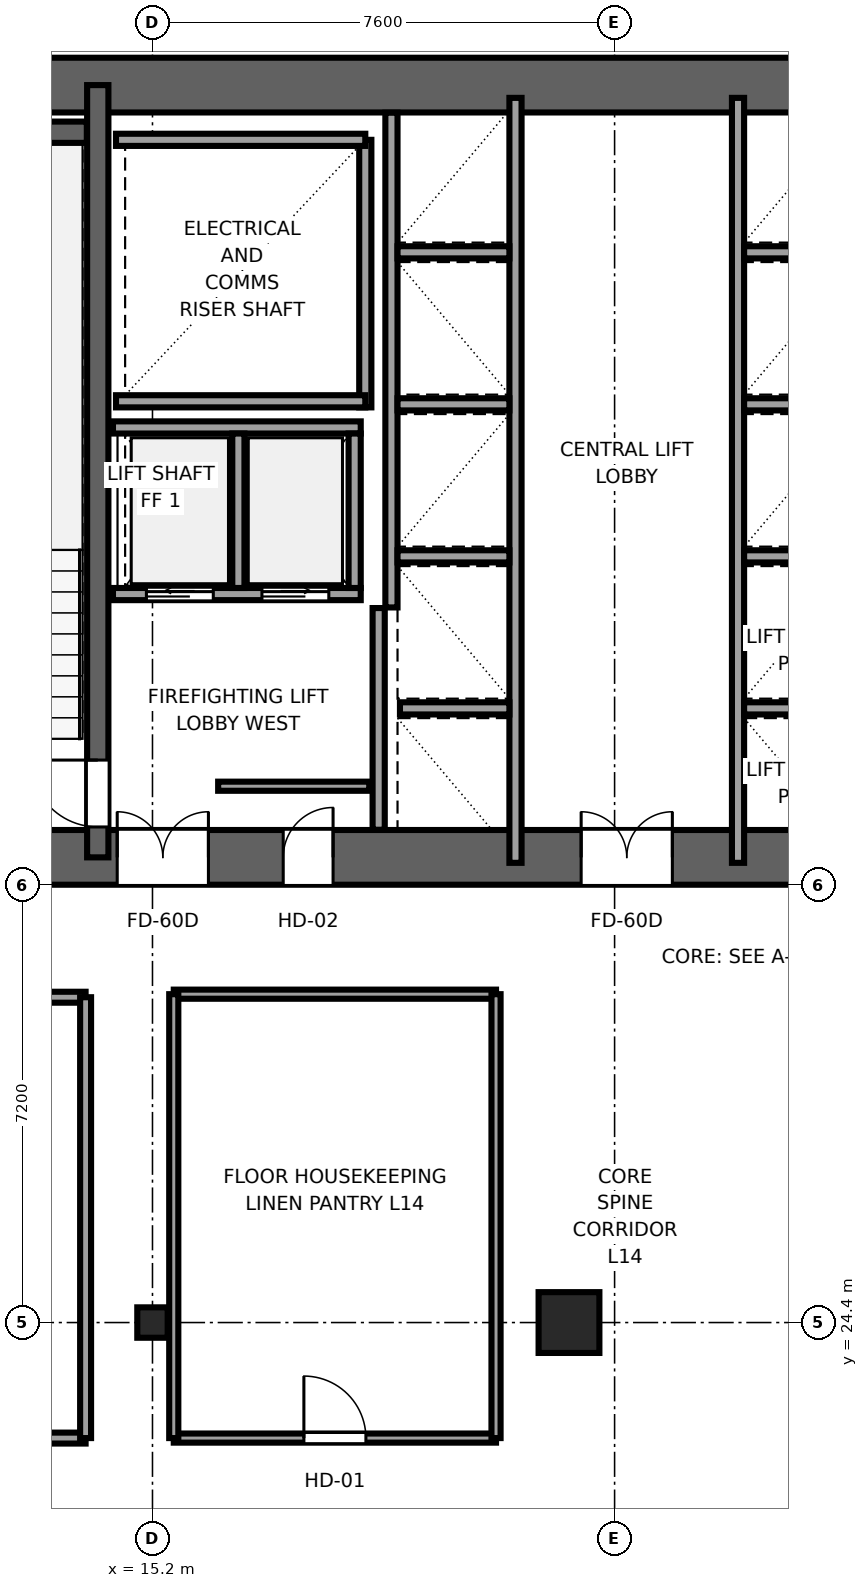
"""IFC4 building model, lengths in metres.
Left out: names, types, materials, properties, quantities, classifications, styles, units other than length and angle.
Written with IfcOpenShell. Run it as: python <this file> out.ifc"""

import sys

from ifc_helpers import new_model, si_unit, direction, frame, frame_2d, origin, origin_2d, place, context, subcontext, project, spatial, rectangle, i_section, extrude, source, transform, mapped, element, fill, save


model = new_model("IFC4")
c1 = context("Model", 3, precision=1e-05, world=origin(), true_north=direction((0.0, 1.0)))
c2 = subcontext(c1, "Body", "Model", "MODEL_VIEW")
j1 = project(units=[si_unit("LENGTHUNIT", "METRE"), si_unit("PLANEANGLEUNIT", "RADIAN")], contexts=[c1])
p1 = place(None, origin())
s1 = spatial("IfcSite", under=j1, at=p1, CompositionType="ELEMENT")
p2 = place(p1, origin())
s2 = spatial("IfcBuilding", under=s1, at=p2, CompositionType="ELEMENT")
p3 = place(p2, frame((0.0, 0.0, 60.4)))
s3 = spatial("IfcBuildingStorey", under=s2, at=p3, CompositionType="ELEMENT", Elevation=60.4)
p4 = place(p3, frame((9.6, 32.05, 0.0), z_axis=(0.0, 0.0, 1.0), x_axis=(1.0, 0.0, 0.0)))
e1 = element("IfcWall", 1, at=p4, inside=s3, PredefinedType="SHEAR", context=c2, shape_type="SweptSolid", body=[
    extrude(rectangle(XDim=26.8, YDim=0.9, at=frame_2d((13.4, 0.0))), origin(), (0.0, 0.0, 1.0), 3.55),
])
p5 = place(p4, frame((6.52, 0.0, 0.0), z_axis=(0.0, 0.0, 1.0), x_axis=(-1.0, 0.0, 0.0)))
e2 = element("IfcOpeningElement", 2, at=p5, cuts=e1, PredefinedType="OPENING", context=c2, shape_type="SweptSolid", body=[
    extrude(rectangle(XDim=1.5, YDim=2.04, at=frame_2d((0.75, 1.02))), frame((0.0, 0.46, 0.0), z_axis=(0.0, -1.0, 0.0), x_axis=(1.0, 0.0, 0.0)), (0.0, 0.0, 1.0), 0.92),
])
p6 = place(p4, frame((14.15, 0.0, 0.0), z_axis=(0.0, 0.0, 1.0), x_axis=(-1.0, 0.0, 0.0)))
e3 = element("IfcOpeningElement", 3, at=p6, cuts=e1, PredefinedType="OPENING", context=c2, shape_type="SweptSolid", body=[
    extrude(rectangle(XDim=1.5, YDim=2.04, at=frame_2d((0.75, 1.02))), frame((0.0, 0.46, 0.0), z_axis=(0.0, -1.0, 0.0), x_axis=(1.0, 0.0, 0.0)), (0.0, 0.0, 1.0), 0.92),
])
p7 = place(p4, frame((21.78, 0.0, 0.0), z_axis=(0.0, 0.0, 1.0), x_axis=(-1.0, 0.0, 0.0)))
e4 = element("IfcOpeningElement", 4, at=p7, cuts=e1, PredefinedType="OPENING", context=c2, shape_type="SweptSolid", body=[
    extrude(rectangle(XDim=1.5, YDim=2.04, at=frame_2d((0.75, 1.02))), frame((0.0, 0.46, 0.0), z_axis=(0.0, -1.0, 0.0), x_axis=(1.0, 0.0, 0.0)), (0.0, 0.0, 1.0), 0.92),
])
p8 = place(p4, frame((8.57, 0.0, 0.0), z_axis=(0.0, 0.0, 1.0), x_axis=(-1.0, 0.0, 0.0)))
e5 = element("IfcOpeningElement", 5, at=p8, cuts=e1, PredefinedType="OPENING", context=c2, shape_type="SweptSolid", body=[
    extrude(rectangle(XDim=0.82, YDim=2.01, at=frame_2d((0.41, 1.005))), frame((0.0, 0.46, 0.0), z_axis=(0.0, -1.0, 0.0), x_axis=(1.0, 0.0, 0.0)), (0.0, 0.0, 1.0), 0.92),
])
p9 = place(p4, frame((19.07, 0.0, 0.0), z_axis=(0.0, 0.0, 1.0), x_axis=(-1.0, 0.0, 0.0)))
e6 = element("IfcOpeningElement", 6, at=p9, cuts=e1, PredefinedType="OPENING", context=c2, shape_type="SweptSolid", body=[
    extrude(rectangle(XDim=0.82, YDim=2.01, at=frame_2d((0.41, 1.005))), frame((0.0, 0.46, 0.0), z_axis=(0.0, -1.0, 0.0), x_axis=(1.0, 0.0, 0.0)), (0.0, 0.0, 1.0), 0.92),
])
p10 = place(p3, frame((9.6, 44.75, 0.0), z_axis=(0.0, 0.0, 1.0), x_axis=(1.0, 0.0, 0.0)))
e7 = element("IfcWall", 7, at=p10, inside=s3, PredefinedType="SHEAR", context=c2, shape_type="SweptSolid", body=[
    extrude(rectangle(XDim=26.8, YDim=0.9, at=frame_2d((13.4, 0.0))), origin(), (0.0, 0.0, 1.0), 3.55),
])
p11 = place(p3, frame((14.3, 32.05, 0.0), z_axis=(0.0, 0.0, 1.0), x_axis=(0.0, 1.0, 0.0)))
e8 = element("IfcWall", 8, at=p11, inside=s3, PredefinedType="SHEAR", context=c2, shape_type="SweptSolid", body=[
    extrude(rectangle(XDim=12.7, YDim=0.35, at=frame_2d((6.35, 0.0))), origin(), (0.0, 0.0, 1.0), 3.55),
])
p12 = place(p11, frame((0.5, 0.0, 0.0)))
e9 = element("IfcOpeningElement", 9, at=p12, cuts=e8, PredefinedType="OPENING", context=c2, shape_type="SweptSolid", body=[
    extrude(rectangle(XDim=1.1, YDim=2.12, at=frame_2d((0.55, 1.06))), frame((0.0, 0.185, 0.0), z_axis=(0.0, -1.0, 0.0), x_axis=(1.0, 0.0, 0.0)), (0.0, 0.0, 1.0), 0.37),
])
p13 = place(p3, frame((10.52, 43.975, 0.0), z_axis=(0.0, 0.0, 1.0), x_axis=(1.0, 0.0, 0.0)))
e10 = element("IfcWall", 10, at=p13, inside=s3, PredefinedType="SHEAR", context=c2, shape_type="SweptSolid", body=[
    extrude(rectangle(XDim=3.6, YDim=0.35, at=frame_2d((1.8, 0.0))), origin(), (0.0, 0.0, 1.0), 3.55),
])
m1 = source(origin(), c2, "Body", "SweptSolid", [
    extrude(i_section(OverallWidth=0.5, OverallDepth=0.5, WebThickness=0.028, FlangeThickness=0.045, at=origin_2d()), origin(), (0.0, 0.0, 1.0), 3.55),
])
p14 = place(p3, frame((15.2, 24.4, 0.0), z_axis=(0.0, 0.0, 1.0), x_axis=(1.0, 0.0, 0.0)))
e11 = element("IfcColumn", 11, at=p14, inside=s3, PredefinedType="COLUMN", context=c2, shape_type="MappedRepresentation", body=[
    mapped(m1, transform((0.0, 0.0, 0.0), x_axis=(1.0, 0.0, 0.0), y_axis=(0.0, 1.0, 0.0), z_axis=(0.0, 0.0, 1.0), scale=1.0)),
])
m2 = source(origin(), c2, "Body", "SweptSolid", [
    extrude(rectangle(XDim=1.0, YDim=1.0, at=origin_2d()), origin(), (0.0, 0.0, 1.0), 3.55),
])
p15 = place(p3, frame((22.05, 24.4, 0.0), z_axis=(0.0, 0.0, 1.0), x_axis=(1.0, 0.0, 0.0)))
e12 = element("IfcColumn", 12, at=p15, inside=s3, PredefinedType="COLUMN", context=c2, shape_type="MappedRepresentation", body=[
    mapped(m2, transform((0.0, 0.0, 0.0), x_axis=(1.0, 0.0, 0.0), y_axis=(0.0, 1.0, 0.0), z_axis=(0.0, 0.0, 1.0), scale=1.0)),
])
p16 = place(p3, frame((18.7, 39.45, 0.0), z_axis=(0.0, 0.0, 1.0), x_axis=(0.0, 1.0, 0.0)))
e13 = element("IfcWall", 13, at=p16, inside=s3, PredefinedType="SOLIDWALL", context=c2, shape_type="SweptSolid", body=[
    extrude(rectangle(XDim=4.4, YDim=0.2, at=frame_2d((2.2, 0.0))), origin(), (0.0, 0.0, 1.0), 3.37),
])
for number, where, z_axis, x_axis in (
    (14, (14.6, 39.55, 0.0), (0.0, 0.0, 1.0), (1.0, 0.0, 0.0)),
    (15, (14.6, 43.85, 0.0), (0.0, 0.0, 1.0), (1.0, 0.0, 0.0)),
):
    element("IfcWall", number, at=place(p3, frame(where, z_axis=z_axis, x_axis=x_axis)), inside=s3, PredefinedType="SOLIDWALL", context=c2, shape_type="SweptSolid", body=[
        extrude(rectangle(XDim=4.1, YDim=0.2, at=frame_2d((2.05, 0.0))), origin(), (0.0, 0.0, 1.0), 3.37),
    ])
p17 = place(p3, frame((18.92, 32.504, 0.0), z_axis=(0.0, 0.0, 1.0), x_axis=(0.0, 1.0, 0.0)))
e16 = element("IfcWall", 16, at=p17, inside=s3, PredefinedType="SOLIDWALL", context=c2, shape_type="SweptSolid", body=[
    extrude(rectangle(XDim=3.646, YDim=0.2, at=frame_2d((1.823, 0.0))), origin(), (0.0, 0.0, 1.0), 3.37),
])
p18 = place(p3, frame((21.17, 31.96, 0.0), z_axis=(0.0, 0.0, 1.0), x_axis=(0.0, 1.0, 0.0)))
e17 = element("IfcWall", 17, at=p18, inside=s3, PredefinedType="SOLIDWALL", context=c2, shape_type="SweptSolid", body=[
    extrude(rectangle(XDim=12.58, YDim=0.2, at=frame_2d((6.29, 0.0))), origin(), (0.0, 0.0, 1.0), 3.37),
])
p19 = place(p3, frame((19.13, 36.16, 0.0), z_axis=(0.0, 0.0, 1.0), x_axis=(0.0, 1.0, 0.0)))
e18 = element("IfcWall", 18, at=p19, inside=s3, PredefinedType="SOLIDWALL", context=c2, shape_type="SweptSolid", body=[
    extrude(rectangle(XDim=8.136, YDim=0.2, at=frame_2d((4.068, 0.0))), origin(), (0.0, 0.0, 1.0), 3.37),
])
p20 = place(p3, frame((19.27, 34.5, 0.0), z_axis=(0.0, 0.0, 1.0), x_axis=(1.0, 0.0, 0.0)))
e19 = element("IfcWall", 19, at=p20, inside=s3, PredefinedType="SOLIDWALL", context=c2, shape_type="SweptSolid", body=[
    extrude(rectangle(XDim=1.8, YDim=0.2, at=frame_2d((0.9, 0.0))), origin(), (0.0, 0.0, 1.0), 3.37),
])
for number, where, z_axis, x_axis in (
    (20, (19.23, 37.0, 0.0), (0.0, 0.0, 1.0), (1.0, 0.0, 0.0)),
    (21, (19.23, 39.5, 0.0), (0.0, 0.0, 1.0), (1.0, 0.0, 0.0)),
    (22, (19.23, 42.0, 0.0), (0.0, 0.0, 1.0), (1.0, 0.0, 0.0)),
):
    element("IfcWall", number, at=place(p3, frame(where, z_axis=z_axis, x_axis=x_axis)), inside=s3, PredefinedType="SOLIDWALL", context=c2, shape_type="SweptSolid", body=[
        extrude(rectangle(XDim=1.84, YDim=0.2, at=frame_2d((0.92, 0.0))), origin(), (0.0, 0.0, 1.0), 3.37),
    ])
p21 = place(p3, frame((14.55, 36.38, 0.0), z_axis=(0.0, 0.0, 1.0), x_axis=(1.0, 0.0, 0.0)))
e23 = element("IfcWall", 23, at=p21, inside=s3, PredefinedType="SOLIDWALL", context=c2, shape_type="SweptSolid", body=[
    extrude(rectangle(XDim=4.075, YDim=0.2, at=frame_2d((2.038, 0.0))), origin(), (0.0, 0.0, 1.0), 3.37),
])
p22 = place(p21, frame((0.55, 0.0, 0.0)))
e24 = element("IfcOpeningElement", 24, at=p22, cuts=e23, PredefinedType="OPENING", context=c2, shape_type="SweptSolid", body=[
    extrude(rectangle(XDim=1.1, YDim=2.12, at=frame_2d((0.55, 1.06))), frame((0.0, 0.11, 0.0), z_axis=(0.0, -1.0, 0.0), x_axis=(1.0, 0.0, 0.0)), (0.0, 0.0, 1.0), 0.22),
])
p23 = place(p21, frame((2.45, 0.0, 0.0)))
e25 = element("IfcOpeningElement", 25, at=p23, cuts=e23, PredefinedType="OPENING", context=c2, shape_type="SweptSolid", body=[
    extrude(rectangle(XDim=1.1, YDim=2.12, at=frame_2d((0.55, 1.06))), frame((0.0, 0.11, 0.0), z_axis=(0.0, -1.0, 0.0), x_axis=(1.0, 0.0, 0.0)), (0.0, 0.0, 1.0), 0.22),
])
p24 = place(p3, frame((14.55, 39.12, 0.0), z_axis=(0.0, 0.0, 1.0), x_axis=(1.0, 0.0, 0.0)))
e26 = element("IfcWall", 26, at=p24, inside=s3, PredefinedType="SOLIDWALL", context=c2, shape_type="SweptSolid", body=[
    extrude(rectangle(XDim=4.075, YDim=0.2, at=frame_2d((2.038, 0.0))), origin(), (0.0, 0.0, 1.0), 3.37),
])
for number, where, z_axis, x_axis in (
    (27, (18.525, 36.48, 0.0), (0.0, 0.0, 1.0), (0.0, 1.0, 0.0)),
    (28, (16.613, 36.48, 0.0), (0.0, 0.0, 1.0), (0.0, 1.0, 0.0)),
):
    element("IfcWall", number, at=place(p3, frame(where, z_axis=z_axis, x_axis=x_axis)), inside=s3, PredefinedType="SOLIDWALL", context=c2, shape_type="SweptSolid", body=[
        extrude(rectangle(XDim=2.54, YDim=0.2, at=frame_2d((1.27, 0.0))), origin(), (0.0, 0.0, 1.0), 3.37),
    ])
p25 = place(p3, frame((24.83, 31.96, 0.0), z_axis=(0.0, 0.0, 1.0), x_axis=(0.0, 1.0, 0.0)))
e29 = element("IfcWall", 29, at=p25, inside=s3, PredefinedType="SOLIDWALL", context=c2, shape_type="SweptSolid", body=[
    extrude(rectangle(XDim=12.58, YDim=0.2, at=frame_2d((6.29, 0.0))), origin(), (0.0, 0.0, 1.0), 3.37),
])
p26 = place(p3, frame((24.93, 34.5, 0.0), z_axis=(0.0, 0.0, 1.0), x_axis=(1.0, 0.0, 0.0)))
e30 = element("IfcWall", 30, at=p26, inside=s3, PredefinedType="SOLIDWALL", context=c2, shape_type="SweptSolid", body=[
    extrude(rectangle(XDim=1.8, YDim=0.2, at=frame_2d((0.9, 0.0))), origin(), (0.0, 0.0, 1.0), 3.37),
])
for number, where, z_axis, x_axis in (
    (31, (24.93, 37.0, 0.0), (0.0, 0.0, 1.0), (1.0, 0.0, 0.0)),
    (32, (24.93, 39.5, 0.0), (0.0, 0.0, 1.0), (1.0, 0.0, 0.0)),
    (33, (24.93, 42.0, 0.0), (0.0, 0.0, 1.0), (1.0, 0.0, 0.0)),
):
    element("IfcWall", number, at=place(p3, frame(where, z_axis=z_axis, x_axis=x_axis)), inside=s3, PredefinedType="SOLIDWALL", context=c2, shape_type="SweptSolid", body=[
        extrude(rectangle(XDim=1.84, YDim=0.2, at=frame_2d((0.92, 0.0))), origin(), (0.0, 0.0, 1.0), 3.37),
    ])
p27 = place(p3, frame((16.28, 33.22, 0.0), z_axis=(0.0, 0.0, 1.0), x_axis=(1.0, 0.0, 0.0)))
e34 = element("IfcWall", 34, at=p27, inside=s3, PredefinedType="PARTITIONING", context=c2, shape_type="SweptSolid", body=[
    extrude(rectangle(XDim=2.485, YDim=0.15, at=frame_2d((1.242, 0.0))), origin(), (0.0, 0.0, 1.0), 3.37),
])
p28 = place(p3, frame((9.88, 22.5, 0.0), z_axis=(0.0, 0.0, 1.0), x_axis=(1.0, 0.0, 0.0)))
e35 = element("IfcWall", 35, at=p28, inside=s3, PredefinedType="PARTITIONING", context=c2, shape_type="SweptSolid", body=[
    extrude(rectangle(XDim=4.22, YDim=0.18, at=frame_2d((2.11, 0.0))), origin(), (0.0, 0.0, 1.0), 3.37),
])
p29 = place(p28, frame((1.285, 0.0, 0.0)))
e36 = element("IfcOpeningElement", 36, at=p29, cuts=e35, PredefinedType="OPENING", context=c2, shape_type="SweptSolid", body=[
    extrude(rectangle(XDim=1.65, YDim=2.15, at=frame_2d((0.825, 1.075))), frame((0.0, 0.1, 0.0), z_axis=(0.0, -1.0, 0.0), x_axis=(1.0, 0.0, 0.0)), (0.0, 0.0, 1.0), 0.2),
])
p30 = place(p3, frame((9.88, 29.75, 0.0), z_axis=(0.0, 0.0, 1.0), x_axis=(1.0, 0.0, 0.0)))
e37 = element("IfcWall", 37, at=p30, inside=s3, PredefinedType="PARTITIONING", context=c2, shape_type="SweptSolid", body=[
    extrude(rectangle(XDim=4.22, YDim=0.18, at=frame_2d((2.11, 0.0))), origin(), (0.0, 0.0, 1.0), 3.37),
])
p31 = place(p3, frame((14.1, 22.5, 0.0), z_axis=(0.0, 0.0, 1.0), x_axis=(0.0, 1.0, 0.0)))
e38 = element("IfcWall", 38, at=p31, inside=s3, PredefinedType="PARTITIONING", context=c2, shape_type="SweptSolid", body=[
    extrude(rectangle(XDim=7.25, YDim=0.18, at=frame_2d((3.625, 0.0))), origin(), (0.0, 0.0, 1.0), 3.37),
])
p32 = place(p3, frame((15.55, 22.5, 0.0), z_axis=(0.0, 0.0, 1.0), x_axis=(1.0, 0.0, 0.0)))
e39 = element("IfcWall", 39, at=p32, inside=s3, PredefinedType="PARTITIONING", context=c2, shape_type="SweptSolid", body=[
    extrude(rectangle(XDim=5.3, YDim=0.15, at=frame_2d((2.65, 0.0))), origin(), (0.0, 0.0, 1.0), 3.37),
])
p33 = place(p32, frame((2.14, 0.0, 0.0)))
e40 = element("IfcOpeningElement", 40, at=p33, cuts=e39, PredefinedType="OPENING", context=c2, shape_type="SweptSolid", body=[
    extrude(rectangle(XDim=1.02, YDim=2.03, at=frame_2d((0.51, 1.015))), frame((0.0, 0.085, 0.0), z_axis=(0.0, -1.0, 0.0), x_axis=(1.0, 0.0, 0.0)), (0.0, 0.0, 1.0), 0.17),
])
p34 = place(p3, frame((15.55, 29.8, 0.0), z_axis=(0.0, 0.0, 1.0), x_axis=(1.0, 0.0, 0.0)))
e41 = element("IfcWall", 41, at=p34, inside=s3, PredefinedType="PARTITIONING", context=c2, shape_type="SweptSolid", body=[
    extrude(rectangle(XDim=5.3, YDim=0.15, at=frame_2d((2.65, 0.0))), origin(), (0.0, 0.0, 1.0), 3.37),
])
for number, where, z_axis, x_axis in (
    (42, (15.55, 22.5, 0.0), (0.0, 0.0, 1.0), (0.0, 1.0, 0.0)),
    (43, (20.85, 22.5, 0.0), (0.0, 0.0, 1.0), (0.0, 1.0, 0.0)),
):
    element("IfcWall", number, at=place(p3, frame(where, z_axis=z_axis, x_axis=x_axis)), inside=s3, PredefinedType="PARTITIONING", context=c2, shape_type="SweptSolid", body=[
        extrude(rectangle(XDim=7.3, YDim=0.15, at=frame_2d((3.65, 0.0))), origin(), (0.0, 0.0, 1.0), 3.37),
    ])
m3 = source(origin(), c2, "Body", "SweptSolid", [
    extrude(rectangle(XDim=1.1, YDim=2.12, at=frame_2d((0.55, 1.06))), frame((0.0, 0.025, 0.0), z_axis=(0.0, -1.0, 0.0), x_axis=(1.0, 0.0, 0.0)), (0.0, 0.0, 1.0), 0.05),
])
p35 = place(p12, origin())
e44 = element("IfcDoor", 44, at=p35, inside=s3, OperationType="SINGLE_SWING_RIGHT", PredefinedType="DOOR", context=c2, shape_type="MappedRepresentation", body=[
    mapped(m3, transform((0.0, 0.0, 0.0), x_axis=(1.0, 0.0, 0.0), y_axis=(0.0, 1.0, 0.0), z_axis=(0.0, 0.0, 1.0), scale=1.0)),
])
fill(e9, e44)
m4 = source(origin(), c2, "Body", "SweptSolid", [
    extrude(rectangle(XDim=1.5, YDim=2.04, at=frame_2d((0.75, 1.02))), frame((0.0, 0.025, 0.0), z_axis=(0.0, -1.0, 0.0), x_axis=(1.0, 0.0, 0.0)), (0.0, 0.0, 1.0), 0.05),
])
p36 = place(p5, origin())
e45 = element("IfcDoor", 45, at=p36, inside=s3, OperationType="DOUBLE_DOOR_SINGLE_SWING", PredefinedType="DOOR", context=c2, shape_type="MappedRepresentation", body=[
    mapped(m4, transform((0.0, 0.0, 0.0), x_axis=(1.0, 0.0, 0.0), y_axis=(0.0, 1.0, 0.0), z_axis=(0.0, 0.0, 1.0), scale=1.0)),
])
fill(e2, e45)
p37 = place(p6, origin())
e46 = element("IfcDoor", 46, at=p37, inside=s3, OperationType="DOUBLE_DOOR_SINGLE_SWING", PredefinedType="DOOR", context=c2, shape_type="MappedRepresentation", body=[
    mapped(m4, transform((0.0, 0.0, 0.0), x_axis=(1.0, 0.0, 0.0), y_axis=(0.0, 1.0, 0.0), z_axis=(0.0, 0.0, 1.0), scale=1.0)),
])
fill(e3, e46)
m5 = source(origin(), c2, "Body", "SweptSolid", [
    extrude(rectangle(XDim=0.82, YDim=2.01, at=frame_2d((0.41, 1.005))), frame((0.0, 0.025, 0.0), z_axis=(0.0, -1.0, 0.0), x_axis=(1.0, 0.0, 0.0)), (0.0, 0.0, 1.0), 0.05),
])
p38 = place(p8, origin())
e47 = element("IfcDoor", 47, at=p38, inside=s3, OperationType="SINGLE_SWING_RIGHT", PredefinedType="DOOR", context=c2, shape_type="MappedRepresentation", body=[
    mapped(m5, transform((0.0, 0.0, 0.0), x_axis=(1.0, 0.0, 0.0), y_axis=(0.0, 1.0, 0.0), z_axis=(0.0, 0.0, 1.0), scale=1.0)),
])
fill(e5, e47)
m6 = source(origin(), c2, "Body", "SweptSolid", [
    extrude(rectangle(XDim=1.1, YDim=2.12, at=frame_2d((0.55, 1.06))), frame((0.0, 0.025, 0.0), z_axis=(0.0, -1.0, 0.0), x_axis=(1.0, 0.0, 0.0)), (0.0, 0.0, 1.0), 0.05),
])
p39 = place(p22, origin())
e48 = element("IfcDoor", 48, at=p39, inside=s3, OperationType="SLIDING_TO_LEFT", PredefinedType="DOOR", context=c2, shape_type="MappedRepresentation", body=[
    mapped(m6, transform((0.0, 0.0, 0.0), x_axis=(1.0, 0.0, 0.0), y_axis=(0.0, 1.0, 0.0), z_axis=(0.0, 0.0, 1.0), scale=1.0)),
])
fill(e24, e48)
p40 = place(p23, origin())
e49 = element("IfcDoor", 49, at=p40, inside=s3, OperationType="SLIDING_TO_RIGHT", PredefinedType="DOOR", context=c2, shape_type="MappedRepresentation", body=[
    mapped(m6, transform((0.0, 0.0, 0.0), x_axis=(1.0, 0.0, 0.0), y_axis=(0.0, 1.0, 0.0), z_axis=(0.0, 0.0, 1.0), scale=1.0)),
])
fill(e25, e49)
m7 = source(origin(), c2, "Body", "SweptSolid", [
    extrude(rectangle(XDim=1.02, YDim=2.03, at=frame_2d((0.51, 1.015))), frame((0.0, 0.025, 0.0), z_axis=(0.0, -1.0, 0.0), x_axis=(1.0, 0.0, 0.0)), (0.0, 0.0, 1.0), 0.05),
])
p41 = place(p33, origin())
e50 = element("IfcDoor", 50, at=p41, inside=s3, OperationType="SINGLE_SWING_LEFT", PredefinedType="DOOR", context=c2, shape_type="MappedRepresentation", body=[
    mapped(m7, transform((0.0, 0.0, 0.0), x_axis=(1.0, 0.0, 0.0), y_axis=(0.0, 1.0, 0.0), z_axis=(0.0, 0.0, 1.0), scale=1.0)),
])
fill(e40, e50)
save(model, sys.argv[1])
